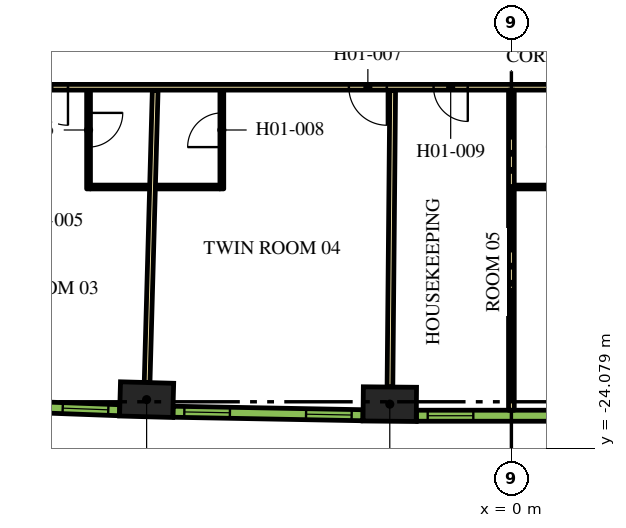
"""IFC4 building model, lengths in metres.
Left out: names, types, materials, properties, quantities, classifications, styles, units other than length and angle.
Written with IfcOpenShell. Run it as: python <this file> out.ifc"""

import sys

from ifc_helpers import new_model, si_unit, direction, frame, frame_2d, origin, origin_2d, place, context, subcontext, project, spatial, rectangle, extrude, element, fill, save


model = new_model("IFC4")
c1 = context("Model", 3, precision=1e-05, world=origin(), true_north=direction((0.0, 1.0)))
c2 = subcontext(c1, "Body", "Model", "MODEL_VIEW")
j1 = project(units=[si_unit("LENGTHUNIT", "METRE"), si_unit("PLANEANGLEUNIT", "RADIAN")], contexts=[c1])
p1 = place(None, origin())
s1 = spatial("IfcSite", under=j1, at=p1, CompositionType="ELEMENT")
p2 = place(p1, origin())
s2 = spatial("IfcBuilding", under=s1, at=p2, CompositionType="ELEMENT")
p3 = place(p2, frame((0.0, 0.0, 27.6)))
s3 = spatial("IfcBuildingStorey", under=s2, at=p3, CompositionType="ELEMENT", Elevation=27.6)
for number, where, z_axis, x_axis in (
    (1, (-9.599, -22.795, 0.0), (0.0, 0.0, 1.0), (1.0, -0.028, 0.0)),
    (2, (-3.2, -22.913, 0.0), (0.0, 0.0, 1.0), (1.0, -0.009, 0.0)),
):
    element("IfcColumn", number, at=place(p3, frame(where, z_axis=z_axis, x_axis=x_axis)), inside=s3, PredefinedType="COLUMN", context=c2, shape_type="SweptSolid", body=[
        extrude(rectangle(XDim=1.4, YDim=0.9, at=origin_2d()), origin(), (0.0, 0.0, 1.0), 3.9),
    ])
p4 = place(p3, frame((12.918, -14.575, 0.0), z_axis=(0.0, 0.0, 1.0), x_axis=(-1.0, 0.0, 0.0)))
e3 = element("IfcWall", 3, at=p4, inside=s3, PredefinedType="PARTITIONING", context=c2, shape_type="SweptSolid", body=[
    extrude(rectangle(XDim=25.766, YDim=0.15, at=frame_2d((12.883, 0.0))), origin(), (0.0, 0.0, 1.0), 2.75),
])
p5 = place(p4, frame((24.586, 0.0, 0.0)))
e4 = element("IfcOpeningElement", 4, at=p5, cuts=e3, PredefinedType="OPENING", context=c2, shape_type="SweptSolid", body=[
    extrude(rectangle(XDim=1.0, YDim=2.1, at=frame_2d((0.5, 1.05))), frame((0.0, 0.085, 0.0), z_axis=(0.0, -1.0, 0.0), x_axis=(1.0, 0.0, 0.0)), (0.0, 0.0, 1.0), 0.17),
])
p6 = place(p4, frame((16.195, 0.0, 0.0)))
e5 = element("IfcOpeningElement", 5, at=p6, cuts=e3, PredefinedType="OPENING", context=c2, shape_type="SweptSolid", body=[
    extrude(rectangle(XDim=1.0, YDim=2.1, at=frame_2d((0.5, 1.05))), frame((0.0, 0.085, 0.0), z_axis=(0.0, -1.0, 0.0), x_axis=(1.0, 0.0, 0.0)), (0.0, 0.0, 1.0), 0.17),
])
p7 = place(p4, frame((14.066, 0.0, 0.0)))
e6 = element("IfcOpeningElement", 6, at=p7, cuts=e3, PredefinedType="OPENING", context=c2, shape_type="SweptSolid", body=[
    extrude(rectangle(XDim=0.9, YDim=2.1, at=frame_2d((0.45, 1.05))), frame((0.0, 0.085, 0.0), z_axis=(0.0, -1.0, 0.0), x_axis=(1.0, 0.0, 0.0)), (0.0, 0.0, 1.0), 0.17),
])
p8 = place(p4, frame((6.824, 0.0, 0.0)))
e7 = element("IfcOpeningElement", 7, at=p8, cuts=e3, PredefinedType="OPENING", context=c2, shape_type="SweptSolid", body=[
    extrude(rectangle(XDim=1.0, YDim=2.1, at=frame_2d((0.5, 1.05))), frame((0.0, 0.085, 0.0), z_axis=(0.0, -1.0, 0.0), x_axis=(1.0, 0.0, 0.0)), (0.0, 0.0, 1.0), 0.17),
])
p9 = place(p4, frame((5.517, 0.0, 0.0)))
e8 = element("IfcOpeningElement", 8, at=p9, cuts=e3, PredefinedType="OPENING", context=c2, shape_type="SweptSolid", body=[
    extrude(rectangle(XDim=1.0, YDim=2.1, at=frame_2d((0.5, 1.05))), frame((0.0, 0.085, 0.0), z_axis=(0.0, -1.0, 0.0), x_axis=(1.0, 0.0, 0.0)), (0.0, 0.0, 1.0), 0.17),
])
p10 = place(p3, frame((-9.586, -22.345, 0.0), z_axis=(0.0, 0.0, 1.0), x_axis=(0.027722115646, 0.999615668297, 0.0)))
e9 = element("IfcWall", 9, at=p10, inside=s3, PredefinedType="PARTITIONING", context=c2, shape_type="SweptSolid", body=[
    extrude(rectangle(XDim=7.688, YDim=0.15, at=frame_2d((3.844, 0.0))), origin(), (0.0, 0.0, 1.0), 2.75),
])
p11 = place(p3, frame((-3.196, -22.463, 0.0), z_axis=(0.0, 0.0, 1.0), x_axis=(0.00926060032, 0.999957119721, 0.0)))
e10 = element("IfcWall", 10, at=p11, inside=s3, PredefinedType="PARTITIONING", context=c2, shape_type="SweptSolid", body=[
    extrude(rectangle(XDim=7.803, YDim=0.15, at=frame_2d((3.902, 0.0))), origin(), (0.0, 0.0, 1.0), 2.75),
])
p12 = place(p3, frame((0.0, -23.073, 0.0), z_axis=(0.0, 0.0, 1.0), x_axis=(0.0, 1.0, 0.0)))
e11 = element("IfcWall", 11, at=p12, inside=s3, PredefinedType="PARTITIONING", context=c2, shape_type="SweptSolid", body=[
    extrude(rectangle(XDim=8.423, YDim=0.15, at=frame_2d((4.212, 0.0))), origin(), (0.0, 0.0, 1.0), 2.75),
])
p13 = place(p3, frame((-11.127, -14.65, 0.0), z_axis=(0.0, 0.0, 1.0), x_axis=(0.0, -1.0, 0.0)))
e12 = element("IfcWall", 12, at=p13, inside=s3, PredefinedType="PARTITIONING", context=c2, shape_type="SweptSolid", body=[
    extrude(rectangle(XDim=2.6, YDim=0.1, at=frame_2d((1.3, 0.0))), origin(), (0.0, 0.0, 1.0), 2.75),
])
p14 = place(p13, frame((0.6, 0.0, 0.0)))
e13 = element("IfcOpeningElement", 13, at=p14, cuts=e12, PredefinedType="OPENING", context=c2, shape_type="SweptSolid", body=[
    extrude(rectangle(XDim=0.9, YDim=2.1, at=frame_2d((0.45, 1.05))), frame((0.0, 0.06, 0.0), z_axis=(0.0, -1.0, 0.0), x_axis=(1.0, 0.0, 0.0)), (0.0, 0.0, 1.0), 0.12),
])
p15 = place(p3, frame((-11.077, -17.2, 0.0), z_axis=(0.0, 0.0, 1.0), x_axis=(1.0, 0.0, 0.0)))
e14 = element("IfcWall", 14, at=p15, inside=s3, PredefinedType="PARTITIONING", context=c2, shape_type="SweptSolid", body=[
    extrude(rectangle(XDim=1.55, YDim=0.1, at=frame_2d((0.775, 0.0))), origin(), (0.0, 0.0, 1.0), 2.75),
])
p16 = place(p3, frame((-7.619, -17.25, 0.0), z_axis=(0.0, 0.0, 1.0), x_axis=(0.0, 1.0, 0.0)))
e15 = element("IfcWall", 15, at=p16, inside=s3, PredefinedType="PARTITIONING", context=c2, shape_type="SweptSolid", body=[
    extrude(rectangle(XDim=2.6, YDim=0.1, at=frame_2d((1.3, 0.0))), origin(), (0.0, 0.0, 1.0), 2.75),
])
p17 = place(p16, frame((1.1, 0.0, 0.0)))
e16 = element("IfcOpeningElement", 16, at=p17, cuts=e15, PredefinedType="OPENING", context=c2, shape_type="SweptSolid", body=[
    extrude(rectangle(XDim=0.9, YDim=2.1, at=frame_2d((0.45, 1.05))), frame((0.0, 0.06, 0.0), z_axis=(0.0, -1.0, 0.0), x_axis=(1.0, 0.0, 0.0)), (0.0, 0.0, 1.0), 0.12),
])
p18 = place(p3, frame((-7.669, -17.2, 0.0), z_axis=(0.0, 0.0, 1.0), x_axis=(-1.0, 0.0, 0.0)))
e17 = element("IfcWall", 17, at=p18, inside=s3, PredefinedType="PARTITIONING", context=c2, shape_type="SweptSolid", body=[
    extrude(rectangle(XDim=1.69, YDim=0.1, at=frame_2d((0.845, 0.0))), origin(), (0.0, 0.0, 1.0), 2.75),
])
p19 = place(p3, frame((1.775, -17.2, 0.0), z_axis=(0.0, 0.0, 1.0), x_axis=(-1.0, 0.0, 0.0)))
e18 = element("IfcWall", 18, at=p19, inside=s3, PredefinedType="PARTITIONING", context=c2, shape_type="SweptSolid", body=[
    extrude(rectangle(XDim=1.7, YDim=0.1, at=frame_2d((0.85, 0.0))), origin(), (0.0, 0.0, 1.0), 2.75),
])
p20 = place(p3, frame((-15.305, -22.889, 0.0), z_axis=(0.0, 0.0, 1.0), x_axis=(0.999317974969, -0.036926750529, 0.0)))
e19 = element("IfcWall", 19, at=p20, inside=s3, PredefinedType="SOLIDWALL", context=c2, shape_type="SweptSolid", body=[
    extrude(rectangle(XDim=4.998, YDim=0.29, at=frame_2d((2.499, 0.0))), origin(), (0.0, 0.0, 1.0), 3.65),
])
p21 = place(p20, frame((0.297, 0.0, 0.9)))
e20 = element("IfcOpeningElement", 20, at=p21, cuts=e19, PredefinedType="OPENING", context=c2, shape_type="SweptSolid", body=[
    extrude(rectangle(XDim=1.2, YDim=2.15, at=frame_2d((0.6, 1.075))), frame((0.0, 0.155, 0.0), z_axis=(0.0, -1.0, 0.0), x_axis=(1.0, 0.0, 0.0)), (0.0, 0.0, 1.0), 0.31),
])
p22 = place(p20, frame((3.501, 0.0, 0.9)))
e21 = element("IfcOpeningElement", 21, at=p22, cuts=e19, PredefinedType="OPENING", context=c2, shape_type="SweptSolid", body=[
    extrude(rectangle(XDim=1.2, YDim=2.15, at=frame_2d((0.6, 1.075))), frame((0.0, 0.155, 0.0), z_axis=(0.0, -1.0, 0.0), x_axis=(1.0, 0.0, 0.0)), (0.0, 0.0, 1.0), 0.31),
])
p23 = place(p3, frame((-8.904, -23.113, 0.0), z_axis=(0.0, 0.0, 1.0), x_axis=(0.999829529479, -0.018463801951, 0.0)))
e22 = element("IfcWall", 22, at=p23, inside=s3, PredefinedType="SOLIDWALL", context=c2, shape_type="SweptSolid", body=[
    extrude(rectangle(XDim=4.998, YDim=0.29, at=frame_2d((2.499, 0.0))), origin(), (0.0, 0.0, 1.0), 3.65),
])
p24 = place(p23, frame((0.297, 0.0, 0.9)))
e23 = element("IfcOpeningElement", 23, at=p24, cuts=e22, PredefinedType="OPENING", context=c2, shape_type="SweptSolid", body=[
    extrude(rectangle(XDim=1.2, YDim=2.15, at=frame_2d((0.6, 1.075))), frame((0.0, 0.155, 0.0), z_axis=(0.0, -1.0, 0.0), x_axis=(1.0, 0.0, 0.0)), (0.0, 0.0, 1.0), 0.31),
])
p25 = place(p23, frame((3.501, 0.0, 0.9)))
e24 = element("IfcOpeningElement", 24, at=p25, cuts=e22, PredefinedType="OPENING", context=c2, shape_type="SweptSolid", body=[
    extrude(rectangle(XDim=1.2, YDim=2.15, at=frame_2d((0.6, 1.075))), frame((0.0, 0.155, 0.0), z_axis=(0.0, -1.0, 0.0), x_axis=(1.0, 0.0, 0.0)), (0.0, 0.0, 1.0), 0.31),
])
p26 = place(p3, frame((-2.499, -23.218, 0.0), z_axis=(0.0, 0.0, 1.0), x_axis=(1.0, 0.0, 0.0)))
e25 = element("IfcWall", 25, at=p26, inside=s3, PredefinedType="SOLIDWALL", context=c2, shape_type="SweptSolid", body=[
    extrude(rectangle(XDim=4.998, YDim=0.29, at=frame_2d((2.499, 0.0))), origin(), (0.0, 0.0, 1.0), 3.65),
])
p27 = place(p26, frame((0.297, 0.0, 0.9)))
e26 = element("IfcOpeningElement", 26, at=p27, cuts=e25, PredefinedType="OPENING", context=c2, shape_type="SweptSolid", body=[
    extrude(rectangle(XDim=1.2, YDim=2.15, at=frame_2d((0.6, 1.075))), frame((0.0, 0.155, 0.0), z_axis=(0.0, -1.0, 0.0), x_axis=(1.0, 0.0, 0.0)), (0.0, 0.0, 1.0), 0.31),
])
p28 = place(p26, frame((3.501, 0.0, 0.9)))
e27 = element("IfcOpeningElement", 27, at=p28, cuts=e25, PredefinedType="OPENING", context=c2, shape_type="SweptSolid", body=[
    extrude(rectangle(XDim=1.2, YDim=2.15, at=frame_2d((0.6, 1.075))), frame((0.0, 0.155, 0.0), z_axis=(0.0, -1.0, 0.0), x_axis=(1.0, 0.0, 0.0)), (0.0, 0.0, 1.0), 0.31),
])
p29 = place(p5, origin())
e28 = element("IfcDoor", 28, at=p29, inside=s3, OperationType="SINGLE_SWING_RIGHT", PredefinedType="DOOR", context=c2, shape_type="SweptSolid", body=[
    extrude(rectangle(XDim=1.0, YDim=2.1, at=frame_2d((0.5, 1.05))), frame((0.0, 0.025, 0.0), z_axis=(0.0, -1.0, 0.0), x_axis=(1.0, 0.0, 0.0)), (0.0, 0.0, 1.0), 0.05),
])
fill(e4, e28)
p30 = place(p14, origin())
e29 = element("IfcDoor", 29, at=p30, inside=s3, OperationType="SINGLE_SWING_RIGHT", PredefinedType="DOOR", context=c2, shape_type="SweptSolid", body=[
    extrude(rectangle(XDim=0.9, YDim=2.1, at=frame_2d((0.45, 1.05))), frame((0.0, 0.025, 0.0), z_axis=(0.0, -1.0, 0.0), x_axis=(1.0, 0.0, 0.0)), (0.0, 0.0, 1.0), 0.05),
])
fill(e13, e29)
p31 = place(p6, origin())
e30 = element("IfcDoor", 30, at=p31, inside=s3, OperationType="SINGLE_SWING_LEFT", PredefinedType="DOOR", context=c2, shape_type="SweptSolid", body=[
    extrude(rectangle(XDim=1.0, YDim=2.1, at=frame_2d((0.5, 1.05))), frame((0.0, 0.025, 0.0), z_axis=(0.0, -1.0, 0.0), x_axis=(1.0, 0.0, 0.0)), (0.0, 0.0, 1.0), 0.05),
])
fill(e5, e30)
p32 = place(p17, origin())
e31 = element("IfcDoor", 31, at=p32, inside=s3, OperationType="SINGLE_SWING_LEFT", PredefinedType="DOOR", context=c2, shape_type="SweptSolid", body=[
    extrude(rectangle(XDim=0.9, YDim=2.1, at=frame_2d((0.45, 1.05))), frame((0.0, 0.025, 0.0), z_axis=(0.0, -1.0, 0.0), x_axis=(1.0, 0.0, 0.0)), (0.0, 0.0, 1.0), 0.05),
])
fill(e16, e31)
p33 = place(p7, origin())
e32 = element("IfcDoor", 32, at=p33, inside=s3, OperationType="SINGLE_SWING_LEFT", PredefinedType="DOOR", context=c2, shape_type="SweptSolid", body=[
    extrude(rectangle(XDim=0.9, YDim=2.1, at=frame_2d((0.45, 1.05))), frame((0.0, 0.025, 0.0), z_axis=(0.0, -1.0, 0.0), x_axis=(1.0, 0.0, 0.0)), (0.0, 0.0, 1.0), 0.05),
])
fill(e6, e32)
p34 = place(p22, origin())
e33 = element("IfcWindow", 33, at=p34, inside=s3, PartitioningType="DOUBLE_PANEL_VERTICAL", PredefinedType="WINDOW", context=c2, shape_type="SweptSolid", body=[
    extrude(rectangle(XDim=1.2, YDim=2.15, at=frame_2d((0.6, 1.075))), frame((0.0, 0.015, 0.0), z_axis=(0.0, -1.0, 0.0), x_axis=(1.0, 0.0, 0.0)), (0.0, 0.0, 1.0), 0.06),
])
fill(e21, e33)
p35 = place(p24, origin())
e34 = element("IfcWindow", 34, at=p35, inside=s3, PartitioningType="DOUBLE_PANEL_VERTICAL", PredefinedType="WINDOW", context=c2, shape_type="SweptSolid", body=[
    extrude(rectangle(XDim=1.2, YDim=2.15, at=frame_2d((0.6, 1.075))), frame((0.0, 0.015, 0.0), z_axis=(0.0, -1.0, 0.0), x_axis=(1.0, 0.0, 0.0)), (0.0, 0.0, 1.0), 0.06),
])
fill(e23, e34)
p36 = place(p25, origin())
e35 = element("IfcWindow", 35, at=p36, inside=s3, PartitioningType="DOUBLE_PANEL_VERTICAL", PredefinedType="WINDOW", context=c2, shape_type="SweptSolid", body=[
    extrude(rectangle(XDim=1.2, YDim=2.15, at=frame_2d((0.6, 1.075))), frame((0.0, 0.015, 0.0), z_axis=(0.0, -1.0, 0.0), x_axis=(1.0, 0.0, 0.0)), (0.0, 0.0, 1.0), 0.06),
])
fill(e24, e35)
p37 = place(p27, origin())
e36 = element("IfcWindow", 36, at=p37, inside=s3, PartitioningType="DOUBLE_PANEL_VERTICAL", PredefinedType="WINDOW", context=c2, shape_type="SweptSolid", body=[
    extrude(rectangle(XDim=1.2, YDim=2.15, at=frame_2d((0.6, 1.075))), frame((0.0, 0.015, 0.0), z_axis=(0.0, -1.0, 0.0), x_axis=(1.0, 0.0, 0.0)), (0.0, 0.0, 1.0), 0.06),
])
fill(e26, e36)
save(model, sys.argv[1])
